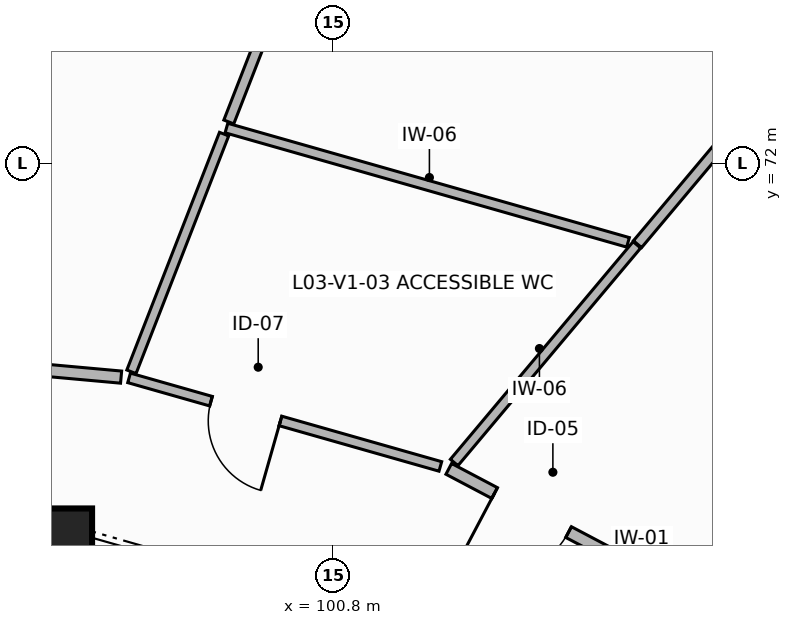
"""IFC4 building model, lengths in metres.
Left out: names, types, materials, properties, quantities, classifications, styles, units other than length and angle.
Written with IfcOpenShell. Run it as: python <this file> out.ifc"""

import sys

from ifc_helpers import new_model, si_unit, direction, frame, frame_2d, origin, origin_2d, place, context, subcontext, project, spatial, rectangle, extrude, element, fill, save


model = new_model("IFC4")
c1 = context("Model", 3, precision=1e-05, world=origin(), true_north=direction((0.0, 1.0)))
c2 = subcontext(c1, "Body", "Model", "MODEL_VIEW")
j1 = project(units=[si_unit("LENGTHUNIT", "METRE"), si_unit("PLANEANGLEUNIT", "RADIAN")], contexts=[c1])
p1 = place(None, origin())
s1 = spatial("IfcSite", under=j1, at=p1, CompositionType="ELEMENT")
p2 = place(p1, origin())
s2 = spatial("IfcBuilding", under=s1, at=p2, CompositionType="ELEMENT")
p3 = place(p2, frame((0.0, 0.0, 12.3)))
s3 = spatial("IfcBuildingStorey", under=s2, at=p3, CompositionType="ELEMENT", Elevation=12.3)
p4 = place(p3, frame((97.327, 67.163, 0.0), z_axis=(0.0, 0.0, 1.0), x_axis=(1.0, 0.0, 0.0)))
e1 = element("IfcColumn", 1, at=p4, inside=s3, PredefinedType="COLUMN", context=c2, shape_type="SweptSolid", body=[
    extrude(rectangle(XDim=0.6, YDim=0.6, at=origin_2d()), origin(), (0.0, 0.0, 1.0), 3.7),
])
p5 = place(p3, frame((105.932, 66.078, 0.0), z_axis=(0.0, 0.0, 1.0), x_axis=(-0.884408058246, 0.466714459289, 0.0)))
e2 = element("IfcWall", 2, at=p5, inside=s3, PredefinedType="PARTITIONING", context=c2, shape_type="SweptSolid", body=[
    extrude(rectangle(XDim=4.084, YDim=0.16, at=frame_2d((2.042, 0.0))), origin(), (0.0, 0.0, 1.0), 2.82),
])
p6 = place(p5, frame((2.302, 0.0, 0.0)))
e3 = element("IfcOpeningElement", 3, at=p6, cuts=e2, PredefinedType="OPENING", context=c2, shape_type="SweptSolid", body=[
    extrude(rectangle(XDim=1.1, YDim=2.2, at=frame_2d((0.55, 1.1))), frame((0.0, 0.09, 0.0), z_axis=(0.0, -1.0, 0.0), x_axis=(1.0, 0.0, 0.0)), (0.0, 0.0, 1.0), 0.18),
])
p7 = place(p3, frame((102.391, 68.068, 0.0), z_axis=(0.0, 0.0, 1.0), x_axis=(0.64304503453, 0.7658283643, 0.0)))
e4 = element("IfcWall", 4, at=p7, inside=s3, PredefinedType="PARTITIONING", context=c2, shape_type="SweptSolid", body=[
    extrude(rectangle(XDim=3.738, YDim=0.13, at=frame_2d((1.869, 0.0))), origin(), (0.0, 0.0, 1.0), 2.82),
])
p8 = place(p3, frame((104.803, 70.94, 0.0), z_axis=(0.0, 0.0, 1.0), x_axis=(0.6431052921, 0.765777763632, 0.0)))
e5 = element("IfcWall", 5, at=p8, inside=s3, PredefinedType="PARTITIONING", context=c2, shape_type="SweptSolid", body=[
    extrude(rectangle(XDim=7.125, YDim=0.14, at=frame_2d((3.562, 0.0))), origin(), (0.0, 0.0, 1.0), 2.82),
])
p9 = place(p3, frame((99.395, 72.468, 0.0), z_axis=(0.0, 0.0, 1.0), x_axis=(0.961788505004, -0.273793483563, 0.0)))
e6 = element("IfcWall", 6, at=p9, inside=s3, PredefinedType="PARTITIONING", context=c2, shape_type="SweptSolid", body=[
    extrude(rectangle(XDim=5.493, YDim=0.13, at=frame_2d((2.747, 0.0))), origin(), (0.0, 0.0, 1.0), 2.82),
])
p10 = place(p3, frame((102.209, 68.016, 0.0), z_axis=(0.0, 0.0, 1.0), x_axis=(-0.961845715117, 0.273592434676, 0.0)))
e7 = element("IfcWall", 7, at=p10, inside=s3, PredefinedType="PARTITIONING", context=c2, shape_type="SweptSolid", body=[
    extrude(rectangle(XDim=4.257, YDim=0.13, at=frame_2d((2.129, 0.0))), origin(), (0.0, 0.0, 1.0), 2.82),
])
p11 = place(p10, frame((2.187, 0.0, 0.0)))
e8 = element("IfcOpeningElement", 8, at=p11, cuts=e7, PredefinedType="OPENING", context=c2, shape_type="SweptSolid", body=[
    extrude(rectangle(XDim=0.95, YDim=2.1, at=frame_2d((0.475, 1.05))), frame((0.0, 0.075, 0.0), z_axis=(0.0, -1.0, 0.0), x_axis=(1.0, 0.0, 0.0)), (0.0, 0.0, 1.0), 0.15),
])
p12 = place(p3, frame((98.145, 69.261, 0.0), z_axis=(0.0, 0.0, 1.0), x_axis=(0.363211414965, 0.931706750024, 0.0)))
e9 = element("IfcWall", 9, at=p12, inside=s3, PredefinedType="PARTITIONING", context=c2, shape_type="SweptSolid", body=[
    extrude(rectangle(XDim=3.356, YDim=0.13, at=frame_2d((1.678, 0.0))), origin(), (0.0, 0.0, 1.0), 2.82),
])
p13 = place(p3, frame((101.76, 78.538, 0.0), z_axis=(0.0, 0.0, 1.0), x_axis=(-0.363060127059, -0.931765713117, 0.0)))
e10 = element("IfcWall", 10, at=p13, inside=s3, PredefinedType="PARTITIONING", context=c2, shape_type="SweptSolid", body=[
    extrude(rectangle(XDim=6.429, YDim=0.14, at=frame_2d((3.214, 0.0))), origin(), (0.0, 0.0, 1.0), 2.82),
])
p14 = place(p3, frame((98.009, 69.191, 0.0), z_axis=(0.0, 0.0, 1.0), x_axis=(-0.995926589216, 0.090167781902, 0.0)))
e11 = element("IfcWall", 11, at=p14, inside=s3, PredefinedType="PARTITIONING", context=c2, shape_type="SweptSolid", body=[
    extrude(rectangle(XDim=4.427, YDim=0.16, at=frame_2d((2.213, 0.0))), origin(), (0.0, 0.0, 1.0), 2.82),
])
p15 = place(p14, frame((1.771, 0.0, 0.0)))
e12 = element("IfcOpeningElement", 12, at=p15, cuts=e11, PredefinedType="OPENING", context=c2, shape_type="SweptSolid", body=[
    extrude(rectangle(XDim=1.1, YDim=2.2, at=frame_2d((0.55, 1.1))), frame((0.0, 0.09, 0.0), z_axis=(0.0, -1.0, 0.0), x_axis=(1.0, 0.0, 0.0)), (0.0, 0.0, 1.0), 0.18),
])
p16 = place(p6, origin())
e13 = element("IfcDoor", 13, at=p16, inside=s3, OperationType="SINGLE_SWING_RIGHT", PredefinedType="DOOR", context=c2, shape_type="SweptSolid", body=[
    extrude(rectangle(XDim=1.1, YDim=2.2, at=frame_2d((0.55, 1.1))), frame((0.0, 0.025, 0.0), z_axis=(0.0, -1.0, 0.0), x_axis=(1.0, 0.0, 0.0)), (0.0, 0.0, 1.0), 0.05),
])
fill(e3, e13)
p17 = place(p11, origin())
e14 = element("IfcDoor", 14, at=p17, inside=s3, OperationType="SINGLE_SWING_LEFT", PredefinedType="DOOR", context=c2, shape_type="SweptSolid", body=[
    extrude(rectangle(XDim=0.95, YDim=2.1, at=frame_2d((0.475, 1.05))), frame((0.0, 0.025, 0.0), z_axis=(0.0, -1.0, 0.0), x_axis=(1.0, 0.0, 0.0)), (0.0, 0.0, 1.0), 0.05),
])
fill(e8, e14)
save(model, sys.argv[1])
